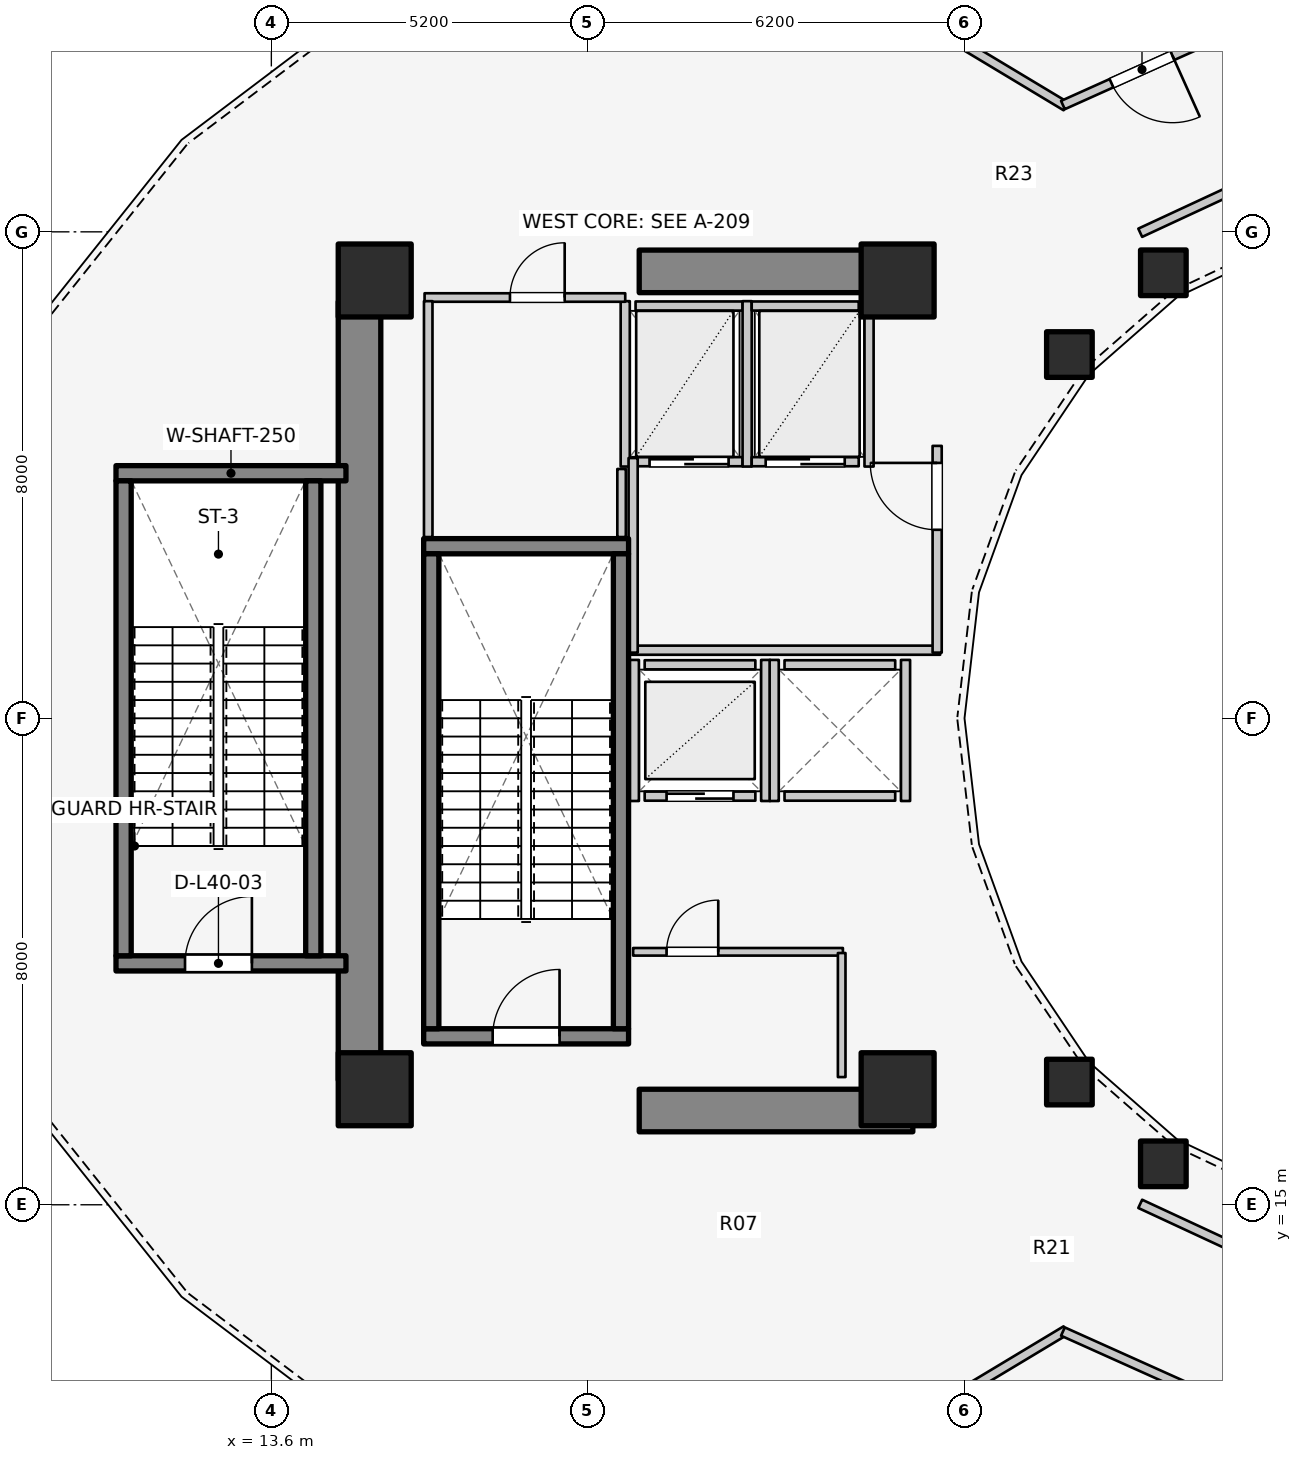
"""IFC4 building model, lengths in metres.
Left out: names, types, materials, properties, quantities, classifications, styles, units other than length and angle.
Written with IfcOpenShell. Run it as: python <this file> out.ifc"""

import sys

from ifc_helpers import new_model, si_unit, direction, frame, frame_2d, origin, origin_2d, place, context, subcontext, project, spatial, rectangle, extrude, element, fill, save


model = new_model("IFC4")
c1 = context("Model", 3, precision=1e-05, world=origin(), true_north=direction((0.0, 1.0)))
c2 = subcontext(c1, "Body", "Model", "MODEL_VIEW")
j1 = project(units=[si_unit("LENGTHUNIT", "METRE"), si_unit("PLANEANGLEUNIT", "RADIAN")], contexts=[c1])
p1 = place(None, origin())
s1 = spatial("IfcSite", under=j1, at=p1, CompositionType="ELEMENT")
p2 = place(p1, origin())
s2 = spatial("IfcBuilding", under=s1, at=p2, CompositionType="ELEMENT")
p3 = place(p2, frame((0.0, 0.0, 133.2)))
s3 = spatial("IfcBuildingStorey", under=s2, at=p3, CompositionType="ELEMENT", Elevation=133.2)
p4 = place(p3, frame((15.05, 17.05, 0.0), z_axis=(0.0, 0.0, 1.0), x_axis=(0.0, 1.0, 0.0)))
e1 = element("IfcWall", 1, at=p4, inside=s3, PredefinedType="SHEAR", context=c2, shape_type="SweptSolid", body=[
    extrude(rectangle(XDim=12.8, YDim=0.7, at=frame_2d((6.4, 0.0))), origin(), (0.0, 0.0, 1.0), 4.2),
])
for number, where, z_axis, x_axis in (
    (2, (19.65, 16.55, 0.0), (0.0, 0.0, 1.0), (1.0, 0.0, 0.0)),
    (3, (19.65, 30.35, 0.0), (0.0, 0.0, 1.0), (1.0, 0.0, 0.0)),
):
    element("IfcWall", number, at=place(p3, frame(where, z_axis=z_axis, x_axis=x_axis)), inside=s3, PredefinedType="SHEAR", context=c2, shape_type="SweptSolid", body=[
        extrude(rectangle(XDim=4.5, YDim=0.7, at=frame_2d((2.25, 0.0))), origin(), (0.0, 0.0, 1.0), 4.2),
    ])
p5 = place(p3, frame((16.105, 17.77, 0.0), z_axis=(0.0, 0.0, 1.0), x_axis=(1.0, 0.0, 0.0)))
e4 = element("IfcWall", 4, at=p5, inside=s3, PredefinedType="SOLIDWALL", context=c2, shape_type="SweptSolid", body=[
    extrude(rectangle(XDim=3.37, YDim=0.25, at=frame_2d((1.685, 0.0))), origin(), (0.0, 0.0, 1.0), 4.2),
])
p6 = place(p5, frame((1.135, 0.0, 0.0)))
e5 = element("IfcOpeningElement", 5, at=p6, cuts=e4, PredefinedType="OPENING", context=c2, shape_type="SweptSolid", body=[
    extrude(rectangle(XDim=1.1, YDim=2.1, at=frame_2d((0.55, 1.05))), frame((0.0, 0.135, 0.0), z_axis=(0.0, -1.0, 0.0), x_axis=(1.0, 0.0, 0.0)), (0.0, 0.0, 1.0), 0.27),
])
p7 = place(p3, frame((16.105, 25.83, 0.0), z_axis=(0.0, 0.0, 1.0), x_axis=(1.0, 0.0, 0.0)))
e6 = element("IfcWall", 6, at=p7, inside=s3, PredefinedType="SOLIDWALL", context=c2, shape_type="SweptSolid", body=[
    extrude(rectangle(XDim=3.37, YDim=0.25, at=frame_2d((1.685, 0.0))), origin(), (0.0, 0.0, 1.0), 4.2),
])
for number, where, z_axis, x_axis in (
    (7, (16.23, 17.895, 0.0), (0.0, 0.0, 1.0), (0.0, 1.0, 0.0)),
    (8, (19.35, 17.895, 0.0), (0.0, 0.0, 1.0), (0.0, 1.0, 0.0)),
):
    element("IfcWall", number, at=place(p3, frame(where, z_axis=z_axis, x_axis=x_axis)), inside=s3, PredefinedType="SOLIDWALL", context=c2, shape_type="SweptSolid", body=[
        extrude(rectangle(XDim=7.81, YDim=0.25, at=frame_2d((3.905, 0.0))), origin(), (0.0, 0.0, 1.0), 4.2),
    ])
p8 = place(p3, frame((11.045, 18.97, 0.0), z_axis=(0.0, 0.0, 1.0), x_axis=(1.0, 0.0, 0.0)))
e9 = element("IfcWall", 9, at=p8, inside=s3, PredefinedType="SOLIDWALL", context=c2, shape_type="SweptSolid", body=[
    extrude(rectangle(XDim=3.782, YDim=0.25, at=frame_2d((1.891, 0.0))), origin(), (0.0, 0.0, 1.0), 4.2),
])
p9 = place(p8, frame((1.135, 0.0, 0.0)))
e10 = element("IfcOpeningElement", 10, at=p9, cuts=e9, PredefinedType="OPENING", context=c2, shape_type="SweptSolid", body=[
    extrude(rectangle(XDim=1.1, YDim=2.1, at=frame_2d((0.55, 1.05))), frame((0.0, 0.135, 0.0), z_axis=(0.0, -1.0, 0.0), x_axis=(1.0, 0.0, 0.0)), (0.0, 0.0, 1.0), 0.27),
])
p10 = place(p3, frame((11.045, 27.03, 0.0), z_axis=(0.0, 0.0, 1.0), x_axis=(1.0, 0.0, 0.0)))
e11 = element("IfcWall", 11, at=p10, inside=s3, PredefinedType="SOLIDWALL", context=c2, shape_type="SweptSolid", body=[
    extrude(rectangle(XDim=3.782, YDim=0.25, at=frame_2d((1.891, 0.0))), origin(), (0.0, 0.0, 1.0), 4.2),
])
for number, where, z_axis, x_axis in (
    (12, (11.17, 19.095, 0.0), (0.0, 0.0, 1.0), (0.0, 1.0, 0.0)),
    (13, (14.29, 19.095, 0.0), (0.0, 0.0, 1.0), (0.0, 1.0, 0.0)),
):
    element("IfcWall", number, at=place(p3, frame(where, z_axis=z_axis, x_axis=x_axis)), inside=s3, PredefinedType="SOLIDWALL", context=c2, shape_type="SweptSolid", body=[
        extrude(rectangle(XDim=7.81, YDim=0.25, at=frame_2d((3.905, 0.0))), origin(), (0.0, 0.0, 1.0), 4.2),
    ])
for number, where, z_axis, x_axis in (
    (14, (15.3, 16.9, 0.0), (0.0, 0.0, 1.0), (1.0, 0.0, 0.0)),
    (15, (23.9, 16.9, 0.0), (0.0, 0.0, 1.0), (1.0, 0.0, 0.0)),
    (16, (23.9, 30.2, 0.0), (0.0, 0.0, 1.0), (1.0, 0.0, 0.0)),
    (17, (15.3, 30.2, 0.0), (0.0, 0.0, 1.0), (1.0, 0.0, 0.0)),
):
    element("IfcColumn", number, at=place(p3, frame(where, z_axis=z_axis, x_axis=x_axis)), inside=s3, PredefinedType="COLUMN", context=c2, shape_type="SweptSolid", body=[
        extrude(rectangle(XDim=1.2, YDim=1.2, at=origin_2d()), origin(), (0.0, 0.0, 1.0), 4.2),
    ])
for number, where, z_axis, x_axis in (
    (18, (28.27, 30.327, 0.0), (0.0, 0.0, 1.0), (1.0, 0.0, 0.0)),
    (19, (26.725, 28.982, 0.0), (0.0, 0.0, 1.0), (1.0, 0.0, 0.0)),
    (20, (26.725, 17.018, 0.0), (0.0, 0.0, 1.0), (1.0, 0.0, 0.0)),
    (21, (28.27, 15.673, 0.0), (0.0, 0.0, 1.0), (1.0, 0.0, 0.0)),
):
    element("IfcColumn", number, at=place(p3, frame(where, z_axis=z_axis, x_axis=x_axis)), inside=s3, PredefinedType="COLUMN", context=c2, shape_type="SweptSolid", body=[
        extrude(rectangle(XDim=0.75, YDim=0.75, at=origin_2d()), origin(), (0.0, 0.0, 1.0), 4.2),
    ])
p11 = place(p3, frame((19.74, 21.72, 0.0), z_axis=(0.0, 0.0, 1.0), x_axis=(1.0, 0.0, 0.0)))
e22 = element("IfcWall", 22, at=p11, inside=s3, PredefinedType="SOLIDWALL", context=c2, shape_type="SweptSolid", body=[
    extrude(rectangle(XDim=1.82, YDim=0.15, at=frame_2d((0.91, 0.0))), origin(), (0.0, 0.0, 1.0), 3.675),
])
p12 = place(p11, frame((0.36, 0.0, 0.0)))
e23 = element("IfcOpeningElement", 23, at=p12, cuts=e22, PredefinedType="OPENING", context=c2, shape_type="SweptSolid", body=[
    extrude(rectangle(XDim=1.1, YDim=2.1, at=frame_2d((0.55, 1.05))), frame((0.0, 0.085, 0.0), z_axis=(0.0, -1.0, 0.0), x_axis=(1.0, 0.0, 0.0)), (0.0, 0.0, 1.0), 0.17),
])
p13 = place(p3, frame((19.74, 23.88, 0.0), z_axis=(0.0, 0.0, 1.0), x_axis=(1.0, 0.0, 0.0)))
e24 = element("IfcWall", 24, at=p13, inside=s3, PredefinedType="SOLIDWALL", context=c2, shape_type="SweptSolid", body=[
    extrude(rectangle(XDim=1.82, YDim=0.15, at=frame_2d((0.91, 0.0))), origin(), (0.0, 0.0, 1.0), 3.675),
])
for number, where, z_axis, x_axis in (
    (25, (19.57, 21.64, 0.0), (0.0, 0.0, 1.0), (0.0, 1.0, 0.0)),
    (26, (21.73, 21.64, 0.0), (0.0, 0.0, 1.0), (0.0, 1.0, 0.0)),
):
    element("IfcWall", number, at=place(p3, frame(where, z_axis=z_axis, x_axis=x_axis)), inside=s3, PredefinedType="SOLIDWALL", context=c2, shape_type="SweptSolid", body=[
        extrude(rectangle(XDim=2.32, YDim=0.15, at=frame_2d((1.16, 0.0))), origin(), (0.0, 0.0, 1.0), 3.675),
    ])
for number, where, z_axis, x_axis in (
    (27, (22.04, 21.72, 0.0), (0.0, 0.0, 1.0), (1.0, 0.0, 0.0)),
    (28, (22.04, 23.88, 0.0), (0.0, 0.0, 1.0), (1.0, 0.0, 0.0)),
):
    element("IfcWall", number, at=place(p3, frame(where, z_axis=z_axis, x_axis=x_axis)), inside=s3, PredefinedType="SOLIDWALL", context=c2, shape_type="SweptSolid", body=[
        extrude(rectangle(XDim=1.82, YDim=0.15, at=frame_2d((0.91, 0.0))), origin(), (0.0, 0.0, 1.0), 3.22),
    ])
p14 = place(p3, frame((21.87, 21.64, 0.0), z_axis=(0.0, 0.0, 1.0), x_axis=(0.0, 1.0, 0.0)))
e29 = element("IfcWall", 29, at=p14, inside=s3, PredefinedType="SOLIDWALL", context=c2, shape_type="SweptSolid", body=[
    extrude(rectangle(XDim=2.32, YDim=0.15, at=frame_2d((1.16, 0.0))), origin(), (0.0, 0.0, 1.0), 3.675),
])
p15 = place(p3, frame((24.03, 21.64, 0.0), z_axis=(0.0, 0.0, 1.0), x_axis=(0.0, 1.0, 0.0)))
e30 = element("IfcWall", 30, at=p15, inside=s3, PredefinedType="SOLIDWALL", context=c2, shape_type="SweptSolid", body=[
    extrude(rectangle(XDim=2.32, YDim=0.15, at=frame_2d((1.16, 0.0))), origin(), (0.0, 0.0, 1.0), 3.22),
])
p16 = place(p3, frame((19.59, 27.22, 0.0), z_axis=(0.0, 0.0, 1.0), x_axis=(1.0, 0.0, 0.0)))
e31 = element("IfcWall", 31, at=p16, inside=s3, PredefinedType="SOLIDWALL", context=c2, shape_type="SweptSolid", body=[
    extrude(rectangle(XDim=1.76, YDim=0.15, at=frame_2d((0.88, 0.0))), origin(), (0.0, 0.0, 1.0), 3.675),
])
p17 = place(p16, frame((0.23, 0.0, 0.0)))
e32 = element("IfcOpeningElement", 32, at=p17, cuts=e31, PredefinedType="OPENING", context=c2, shape_type="SweptSolid", body=[
    extrude(rectangle(XDim=1.3, YDim=2.1, at=frame_2d((0.65, 1.05))), frame((0.0, 0.085, 0.0), z_axis=(0.0, -1.0, 0.0), x_axis=(1.0, 0.0, 0.0)), (0.0, 0.0, 1.0), 0.17),
])
p18 = place(p3, frame((19.59, 29.78, 0.0), z_axis=(0.0, 0.0, 1.0), x_axis=(1.0, 0.0, 0.0)))
e33 = element("IfcWall", 33, at=p18, inside=s3, PredefinedType="SOLIDWALL", context=c2, shape_type="SweptSolid", body=[
    extrude(rectangle(XDim=1.76, YDim=0.15, at=frame_2d((0.88, 0.0))), origin(), (0.0, 0.0, 1.0), 3.675),
])
for number, where, z_axis, x_axis in (
    (34, (19.42, 27.14, 0.0), (0.0, 0.0, 1.0), (0.0, 1.0, 0.0)),
    (35, (21.425, 27.14, 0.0), (0.0, 0.0, 1.0), (0.0, 1.0, 0.0)),
):
    element("IfcWall", number, at=place(p3, frame(where, z_axis=z_axis, x_axis=x_axis)), inside=s3, PredefinedType="SOLIDWALL", context=c2, shape_type="SweptSolid", body=[
        extrude(rectangle(XDim=2.72, YDim=0.15, at=frame_2d((1.36, 0.0))), origin(), (0.0, 0.0, 1.0), 3.675),
    ])
p19 = place(p3, frame((21.5, 27.22, 0.0), z_axis=(0.0, 0.0, 1.0), x_axis=(1.0, 0.0, 0.0)))
e36 = element("IfcWall", 36, at=p19, inside=s3, PredefinedType="SOLIDWALL", context=c2, shape_type="SweptSolid", body=[
    extrude(rectangle(XDim=1.76, YDim=0.15, at=frame_2d((0.88, 0.0))), origin(), (0.0, 0.0, 1.0), 3.675),
])
p20 = place(p19, frame((0.23, 0.0, 0.0)))
e37 = element("IfcOpeningElement", 37, at=p20, cuts=e36, PredefinedType="OPENING", context=c2, shape_type="SweptSolid", body=[
    extrude(rectangle(XDim=1.3, YDim=2.1, at=frame_2d((0.65, 1.05))), frame((0.0, 0.085, 0.0), z_axis=(0.0, -1.0, 0.0), x_axis=(1.0, 0.0, 0.0)), (0.0, 0.0, 1.0), 0.17),
])
p21 = place(p3, frame((21.5, 29.78, 0.0), z_axis=(0.0, 0.0, 1.0), x_axis=(1.0, 0.0, 0.0)))
e38 = element("IfcWall", 38, at=p21, inside=s3, PredefinedType="SOLIDWALL", context=c2, shape_type="SweptSolid", body=[
    extrude(rectangle(XDim=1.76, YDim=0.15, at=frame_2d((0.88, 0.0))), origin(), (0.0, 0.0, 1.0), 3.675),
])
p22 = place(p3, frame((23.43, 27.14, 0.0), z_axis=(0.0, 0.0, 1.0), x_axis=(0.0, 1.0, 0.0)))
e39 = element("IfcWall", 39, at=p22, inside=s3, PredefinedType="SOLIDWALL", context=c2, shape_type="SweptSolid", body=[
    extrude(rectangle(XDim=2.72, YDim=0.15, at=frame_2d((1.36, 0.0))), origin(), (0.0, 0.0, 1.0), 3.675),
])
p23 = place(p3, frame((19.52, 24.12, 0.0), z_axis=(0.0, 0.0, 1.0), x_axis=(1.0, 0.0, 0.0)))
e40 = element("IfcWall", 40, at=p23, inside=s3, PredefinedType="PARTITIONING", context=c2, shape_type="SweptSolid", body=[
    extrude(rectangle(XDim=5.08, YDim=0.15, at=frame_2d((2.54, 0.0))), origin(), (0.0, 0.0, 1.0), 3.22),
])
p24 = place(p3, frame((19.55, 24.08, 0.0), z_axis=(0.0, 0.0, 1.0), x_axis=(0.0, 1.0, 0.0)))
e41 = element("IfcWall", 41, at=p24, inside=s3, PredefinedType="PARTITIONING", context=c2, shape_type="SweptSolid", body=[
    extrude(rectangle(XDim=3.2, YDim=0.15, at=frame_2d((1.6, 0.0))), origin(), (0.0, 0.0, 1.0), 3.675),
])
p25 = place(p3, frame((24.55, 24.08, 0.0), z_axis=(0.0, 0.0, 1.0), x_axis=(0.0, 1.0, 0.0)))
e42 = element("IfcWall", 42, at=p25, inside=s3, PredefinedType="PARTITIONING", context=c2, shape_type="SweptSolid", body=[
    extrude(rectangle(XDim=3.4, YDim=0.15, at=frame_2d((1.7, 0.0))), origin(), (0.0, 0.0, 1.0), 3.675),
])
p26 = place(p25, frame((2.02, 0.0, 0.0)))
e43 = element("IfcOpeningElement", 43, at=p26, cuts=e42, PredefinedType="OPENING", context=c2, shape_type="SweptSolid", body=[
    extrude(rectangle(XDim=1.1, YDim=2.1, at=frame_2d((0.55, 1.05))), frame((0.0, 0.085, 0.0), z_axis=(0.0, -1.0, 0.0), x_axis=(1.0, 0.0, 0.0)), (0.0, 0.0, 1.0), 0.17),
])
p27 = place(p3, frame((19.55, 19.16, 0.0), z_axis=(0.0, 0.0, 1.0), x_axis=(1.0, 0.0, 0.0)))
e44 = element("IfcWall", 44, at=p27, inside=s3, PredefinedType="PARTITIONING", context=c2, shape_type="SweptSolid", body=[
    extrude(rectangle(XDim=3.45, YDim=0.125, at=frame_2d((1.725, 0.0))), origin(), (0.0, 0.0, 1.0), 3.22),
])
p28 = place(p27, frame((0.55, 0.0, 0.0)))
e45 = element("IfcOpeningElement", 45, at=p28, cuts=e44, PredefinedType="OPENING", context=c2, shape_type="SweptSolid", body=[
    extrude(rectangle(XDim=0.85, YDim=2.05, at=frame_2d((0.425, 1.025))), frame((0.0, 0.073, 0.0), z_axis=(0.0, -1.0, 0.0), x_axis=(1.0, 0.0, 0.0)), (0.0, 0.0, 1.0), 0.145),
])
p29 = place(p3, frame((22.98, 17.1, 0.0), z_axis=(0.0, 0.0, 1.0), x_axis=(0.0, 1.0, 0.0)))
e46 = element("IfcWall", 46, at=p29, inside=s3, PredefinedType="PARTITIONING", context=c2, shape_type="SweptSolid", body=[
    extrude(rectangle(XDim=2.04, YDim=0.125, at=frame_2d((1.02, 0.0))), origin(), (0.0, 0.0, 1.0), 3.675),
])
for number, where, z_axis, x_axis in (
    (47, (29.873, 31.906, 0.0), (0.0, 0.0, 1.0), (-0.907, -0.421, 0.0)),
    (48, (27.89, 15.015, 0.0), (0.0, 0.0, 1.0), (0.907, -0.421, 0.0)),
):
    element("IfcWall", number, at=place(p3, frame(where, z_axis=z_axis, x_axis=x_axis)), inside=s3, PredefinedType="PARTITIONING", context=c2, shape_type="SweptSolid", body=[
        extrude(rectangle(XDim=2.186, YDim=0.15, at=frame_2d((1.093, 0.0))), origin(), (0.0, 0.0, 1.0), 2.32),
    ])
p30 = place(p3, frame((26.668, 33.063, 0.0), z_axis=(0.0, 0.0, 1.0), x_axis=(-0.857109469509, 0.515134309941, 0.0)))
e49 = element("IfcWall", 49, at=p30, inside=s3, PredefinedType="PARTITIONING", context=c2, shape_type="SweptSolid", body=[
    extrude(rectangle(XDim=7.757, YDim=0.15, at=frame_2d((3.879, 0.0))), origin(), (0.0, 0.0, 1.0), 2.32),
])
p31 = place(p3, frame((29.219, 34.254, 0.0), z_axis=(0.0, 0.0, 1.0), x_axis=(-0.9121872495, -0.409773622687, 0.0)))
e50 = element("IfcWall", 50, at=p31, inside=s3, PredefinedType="PARTITIONING", context=c2, shape_type="SweptSolid", body=[
    extrude(rectangle(XDim=2.852, YDim=0.15, at=frame_2d((1.426, 0.0))), origin(), (0.0, 0.0, 1.0), 2.32),
])
p32 = place(p31, frame((0.876, 0.0, 0.0)))
e51 = element("IfcOpeningElement", 51, at=p32, cuts=e50, PredefinedType="OPENING", context=c2, shape_type="SweptSolid", body=[
    extrude(rectangle(XDim=1.1, YDim=2.1, at=frame_2d((0.55, 1.05))), frame((0.0, 0.085, 0.0), z_axis=(0.0, -1.0, 0.0), x_axis=(1.0, 0.0, 0.0)), (0.0, 0.0, 1.0), 0.17),
])
p33 = place(p3, frame((26.668, 12.937, 0.0), z_axis=(0.0, 0.0, 1.0), x_axis=(-0.857109469509, -0.515134309941, 0.0)))
e52 = element("IfcWall", 52, at=p33, inside=s3, PredefinedType="PARTITIONING", context=c2, shape_type="SweptSolid", body=[
    extrude(rectangle(XDim=7.757, YDim=0.15, at=frame_2d((3.879, 0.0))), origin(), (0.0, 0.0, 1.0), 2.32),
])
p34 = place(p3, frame((26.618, 12.915, 0.0), z_axis=(0.0, 0.0, 1.0), x_axis=(0.9121872495, -0.409773622687, 0.0)))
e53 = element("IfcWall", 53, at=p34, inside=s3, PredefinedType="PARTITIONING", context=c2, shape_type="SweptSolid", body=[
    extrude(rectangle(XDim=2.852, YDim=0.15, at=frame_2d((1.426, 0.0))), origin(), (0.0, 0.0, 1.0), 2.32),
])
p35 = place(p3, frame((16.12, 29.92, 0.0), z_axis=(0.0, 0.0, 1.0), x_axis=(1.0, 0.0, 0.0)))
e54 = element("IfcWall", 54, at=p35, inside=s3, PredefinedType="PLUMBINGWALL", context=c2, shape_type="SweptSolid", body=[
    extrude(rectangle(XDim=3.3, YDim=0.14, at=frame_2d((1.65, 0.0))), origin(), (0.0, 0.0, 1.0), 3.675),
])
p36 = place(p35, frame((1.404, 0.0, 0.0)))
e55 = element("IfcOpeningElement", 55, at=p36, cuts=e54, PredefinedType="OPENING", context=c2, shape_type="SweptSolid", body=[
    extrude(rectangle(XDim=0.9, YDim=2.1, at=frame_2d((0.45, 1.05))), frame((0.0, 0.08, 0.0), z_axis=(0.0, -1.0, 0.0), x_axis=(1.0, 0.0, 0.0)), (0.0, 0.0, 1.0), 0.16),
])
p37 = place(p3, frame((16.18, 25.98, 0.0), z_axis=(0.0, 0.0, 1.0), x_axis=(0.0, 1.0, 0.0)))
e56 = element("IfcWall", 56, at=p37, inside=s3, PredefinedType="PLUMBINGWALL", context=c2, shape_type="SweptSolid", body=[
    extrude(rectangle(XDim=3.88, YDim=0.14, at=frame_2d((1.94, 0.0))), origin(), (0.0, 0.0, 1.0), 3.675),
])
p38 = place(p3, frame((19.36, 25.98, 0.0), z_axis=(0.0, 0.0, 1.0), x_axis=(0.0, 1.0, 0.0)))
e57 = element("IfcWall", 57, at=p38, inside=s3, PredefinedType="PLUMBINGWALL", context=c2, shape_type="SweptSolid", body=[
    extrude(rectangle(XDim=1.12, YDim=0.14, at=frame_2d((0.56, 0.0))), origin(), (0.0, 0.0, 1.0), 3.675),
])
p39 = place(p6, origin())
e58 = element("IfcDoor", 58, at=p39, inside=s3, OperationType="SINGLE_SWING_RIGHT", PredefinedType="DOOR", context=c2, shape_type="SweptSolid", body=[
    extrude(rectangle(XDim=1.1, YDim=2.1, at=frame_2d((0.55, 1.05))), frame((0.0, 0.025, 0.0), z_axis=(0.0, -1.0, 0.0), x_axis=(1.0, 0.0, 0.0)), (0.0, 0.0, 1.0), 0.05),
])
fill(e5, e58)
p40 = place(p9, origin())
e59 = element("IfcDoor", 59, at=p40, inside=s3, OperationType="SINGLE_SWING_RIGHT", PredefinedType="DOOR", context=c2, shape_type="SweptSolid", body=[
    extrude(rectangle(XDim=1.1, YDim=2.1, at=frame_2d((0.55, 1.05))), frame((0.0, 0.025, 0.0), z_axis=(0.0, -1.0, 0.0), x_axis=(1.0, 0.0, 0.0)), (0.0, 0.0, 1.0), 0.05),
])
fill(e10, e59)
p41 = place(p12, origin())
e60 = element("IfcDoor", 60, at=p41, inside=s3, OperationType="DOUBLE_DOOR_SLIDING", PredefinedType="DOOR", context=c2, shape_type="SweptSolid", body=[
    extrude(rectangle(XDim=1.1, YDim=2.1, at=frame_2d((0.55, 1.05))), frame((0.0, 0.025, 0.0), z_axis=(0.0, -1.0, 0.0), x_axis=(1.0, 0.0, 0.0)), (0.0, 0.0, 1.0), 0.05),
])
fill(e23, e60)
p42 = place(p17, origin())
e61 = element("IfcDoor", 61, at=p42, inside=s3, OperationType="DOUBLE_DOOR_SLIDING", PredefinedType="DOOR", context=c2, shape_type="SweptSolid", body=[
    extrude(rectangle(XDim=1.3, YDim=2.1, at=frame_2d((0.65, 1.05))), frame((0.0, 0.025, 0.0), z_axis=(0.0, -1.0, 0.0), x_axis=(1.0, 0.0, 0.0)), (0.0, 0.0, 1.0), 0.05),
])
fill(e32, e61)
p43 = place(p20, origin())
e62 = element("IfcDoor", 62, at=p43, inside=s3, OperationType="DOUBLE_DOOR_SLIDING", PredefinedType="DOOR", context=c2, shape_type="SweptSolid", body=[
    extrude(rectangle(XDim=1.3, YDim=2.1, at=frame_2d((0.65, 1.05))), frame((0.0, 0.025, 0.0), z_axis=(0.0, -1.0, 0.0), x_axis=(1.0, 0.0, 0.0)), (0.0, 0.0, 1.0), 0.05),
])
fill(e37, e62)
p44 = place(p26, origin())
e63 = element("IfcDoor", 63, at=p44, inside=s3, OperationType="SINGLE_SWING_RIGHT", PredefinedType="DOOR", context=c2, shape_type="SweptSolid", body=[
    extrude(rectangle(XDim=1.1, YDim=2.1, at=frame_2d((0.55, 1.05))), frame((0.0, 0.025, 0.0), z_axis=(0.0, -1.0, 0.0), x_axis=(1.0, 0.0, 0.0)), (0.0, 0.0, 1.0), 0.05),
])
fill(e43, e63)
p45 = place(p28, origin())
e64 = element("IfcDoor", 64, at=p45, inside=s3, OperationType="SINGLE_SWING_RIGHT", PredefinedType="DOOR", context=c2, shape_type="SweptSolid", body=[
    extrude(rectangle(XDim=0.85, YDim=2.05, at=frame_2d((0.425, 1.025))), frame((0.0, 0.025, 0.0), z_axis=(0.0, -1.0, 0.0), x_axis=(1.0, 0.0, 0.0)), (0.0, 0.0, 1.0), 0.05),
])
fill(e45, e64)
p46 = place(p32, origin())
e65 = element("IfcDoor", 65, at=p46, inside=s3, OperationType="SINGLE_SWING_LEFT", PredefinedType="DOOR", context=c2, shape_type="SweptSolid", body=[
    extrude(rectangle(XDim=1.1, YDim=2.1, at=frame_2d((0.55, 1.05))), frame((0.0, 0.025, 0.0), z_axis=(0.0, -1.0, 0.0), x_axis=(1.0, 0.0, 0.0)), (0.0, 0.0, 1.0), 0.05),
])
fill(e51, e65)
p47 = place(p36, origin())
e66 = element("IfcDoor", 66, at=p47, inside=s3, OperationType="SINGLE_SWING_RIGHT", PredefinedType="DOOR", context=c2, shape_type="SweptSolid", body=[
    extrude(rectangle(XDim=0.9, YDim=2.1, at=frame_2d((0.45, 1.05))), frame((0.0, 0.025, 0.0), z_axis=(0.0, -1.0, 0.0), x_axis=(1.0, 0.0, 0.0)), (0.0, 0.0, 1.0), 0.05),
])
fill(e55, e66)
save(model, sys.argv[1])
